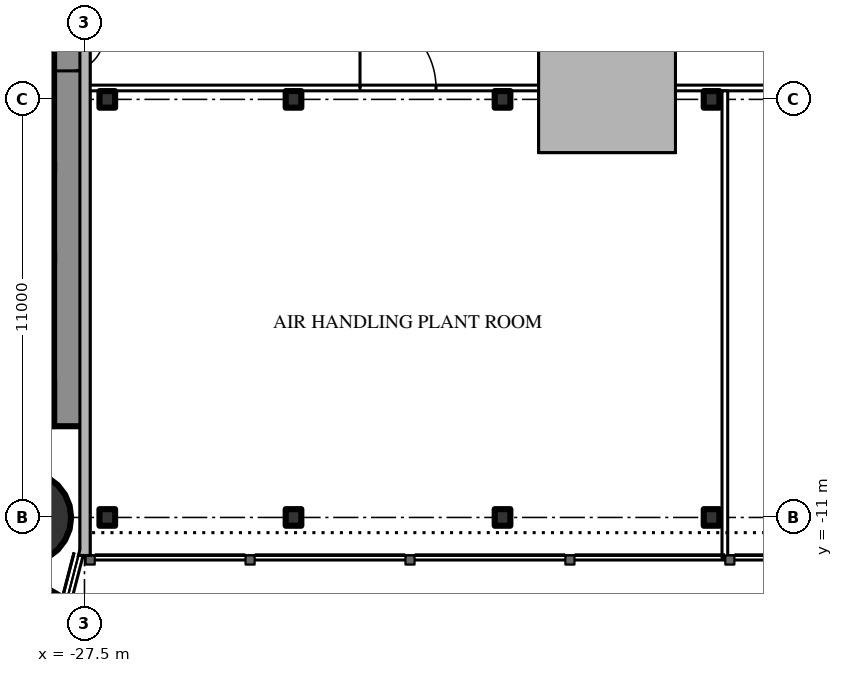
"""IFC4 building model, lengths in metres.
Left out: names, types, materials, properties, quantities, classifications, styles, units other than length and angle.
Written with IfcOpenShell. Run it as: python <this file> out.ifc"""

import sys

from ifc_helpers import new_model, si_unit, direction, frame, frame_2d, origin, origin_2d, place, context, subcontext, project, spatial, rectangle, circle, i_section, extrude, element, fill, save


model = new_model("IFC4")
c1 = context("Model", 3, precision=1e-05, world=origin(), true_north=direction((0.0, 1.0)))
c2 = subcontext(c1, "Body", "Model", "MODEL_VIEW")
j1 = project(units=[si_unit("LENGTHUNIT", "METRE"), si_unit("PLANEANGLEUNIT", "RADIAN")], contexts=[c1])
p1 = place(None, origin())
s1 = spatial("IfcSite", under=j1, at=p1, CompositionType="ELEMENT")
p2 = place(p1, origin())
s2 = spatial("IfcBuilding", under=s1, at=p2, CompositionType="ELEMENT")
p3 = place(p2, frame((0.0, 0.0, 268.3)))
s3 = spatial("IfcBuildingStorey", under=s2, at=p3, CompositionType="ELEMENT", Elevation=268.3)
p4 = place(p3, frame((-29.05, -11.0, 0.0), z_axis=(0.0, 0.0, 1.0), x_axis=(1.0, 0.0, 0.0)))
e1 = element("IfcColumn", 1, at=p4, inside=s3, PredefinedType="COLUMN", context=c2, shape_type="SweptSolid", body=[
    extrude(circle(Radius=1.2, at=origin_2d()), origin(), (0.0, 0.0, 1.0), 5.0),
])
p5 = place(p3, frame((-27.9, 8.6, 0.0), z_axis=(0.0, 0.0, 1.0), x_axis=(0.0, -1.0, 0.0)))
e2 = element("IfcWall", 2, at=p5, inside=s3, PredefinedType="SHEAR", context=c2, shape_type="SweptSolid", body=[
    extrude(rectangle(XDim=17.2, YDim=0.8, at=frame_2d((8.6, 0.0))), origin(), (0.0, 0.0, 1.0), 5.0),
])
p6 = place(p5, frame((6.95, 0.0, 0.0)))
e3 = element("IfcOpeningElement", 3, at=p6, cuts=e2, PredefinedType="OPENING", context=c2, shape_type="SweptSolid", body=[
    extrude(rectangle(XDim=0.9, YDim=2.2, at=frame_2d((0.45, 1.1))), frame((0.0, 0.41, 0.0), z_axis=(0.0, -1.0, 0.0), x_axis=(1.0, 0.0, 0.0)), (0.0, 0.0, 1.0), 0.82),
])
p7 = place(p3, frame((-28.3, -8.0, 0.0), z_axis=(0.0, 0.0, 1.0), x_axis=(-1.0, 0.0, 0.0)))
e4 = element("IfcWall", 4, at=p7, inside=s3, PredefinedType="SHEAR", context=c2, shape_type="SweptSolid", body=[
    extrude(rectangle(XDim=8.4, YDim=1.2, at=frame_2d((4.2, 0.0))), origin(), (0.0, 0.0, 1.0), 5.0),
])
p8 = place(p7, frame((0.25, 0.0, 0.0)))
e5 = element("IfcOpeningElement", 5, at=p8, cuts=e4, PredefinedType="OPENING", context=c2, shape_type="SweptSolid", body=[
    extrude(rectangle(XDim=1.0, YDim=2.2, at=frame_2d((0.5, 1.1))), frame((0.0, 0.61, 0.0), z_axis=(0.0, -1.0, 0.0), x_axis=(1.0, 0.0, 0.0)), (0.0, 0.0, 1.0), 1.22),
])
p9 = place(p3, frame((-28.3, -4.15, 0.0), z_axis=(0.0, 0.0, 1.0), x_axis=(-1.0, 0.0, 0.0)))
e6 = element("IfcWall", 6, at=p9, inside=s3, PredefinedType="SHEAR", context=c2, shape_type="SweptSolid", body=[
    extrude(rectangle(XDim=8.4, YDim=0.3, at=frame_2d((4.2, 0.0))), origin(), (0.0, 0.0, 1.0), 5.0),
])
p10 = place(p3, frame((-28.3, -1.775, 0.0), z_axis=(0.0, 0.0, 1.0), x_axis=(-1.0, 0.0, 0.0)))
e7 = element("IfcWall", 7, at=p10, inside=s3, PredefinedType="SHEAR", context=c2, shape_type="SweptSolid", body=[
    extrude(rectangle(XDim=2.9, YDim=0.25, at=frame_2d((1.45, 0.0))), origin(), (0.0, 0.0, 1.0), 5.0),
])
p11 = place(p3, frame((-27.2, 14.3, 0.0), z_axis=(0.0, 0.0, 1.0), x_axis=(-0.866026593062, -0.499997940104, 0.0)))
e8 = element("IfcWall", 8, at=p11, inside=s3, PredefinedType="SHEAR", context=c2, shape_type="SweptSolid", body=[
    extrude(rectangle(XDim=28.946, YDim=1.2, at=frame_2d((14.473, 0.0))), origin(), (0.0, 0.0, 1.0), 5.0),
])
p12 = place(p11, frame((4.6, 0.0, 0.0)))
e9 = element("IfcOpeningElement", 9, at=p12, cuts=e8, PredefinedType="OPENING", context=c2, shape_type="SweptSolid", body=[
    extrude(rectangle(XDim=1.0, YDim=2.2, at=frame_2d((0.5, 1.1))), frame((0.0, 0.61, 0.0), z_axis=(0.0, -1.0, 0.0), x_axis=(1.0, 0.0, 0.0)), (0.0, 0.0, 1.0), 1.22),
])
p13 = place(p11, frame((13.395, 0.0, 0.0)))
e10 = element("IfcOpeningElement", 10, at=p13, cuts=e8, PredefinedType="OPENING", context=c2, shape_type="SweptSolid", body=[
    extrude(rectangle(XDim=1.8, YDim=2.2, at=frame_2d((0.9, 1.1))), frame((0.0, 0.61, 0.0), z_axis=(0.0, -1.0, 0.0), x_axis=(1.0, 0.0, 0.0)), (0.0, 0.0, 1.0), 1.22),
])
p14 = place(p3, frame((-27.2, -14.3, 0.0), z_axis=(0.0, 0.0, 1.0), x_axis=(-0.866024021859, 0.500002393557, 0.0)))
e11 = element("IfcWall", 11, at=p14, inside=s3, PredefinedType="SHEAR", context=c2, shape_type="SweptSolid", body=[
    extrude(rectangle(XDim=27.907, YDim=1.2, at=frame_2d((13.954, 0.0))), origin(), (0.0, 0.0, 1.0), 5.0),
])
p15 = place(p14, frame((4.6, 0.0, 0.0)))
e12 = element("IfcOpeningElement", 12, at=p15, cuts=e11, PredefinedType="OPENING", context=c2, shape_type="SweptSolid", body=[
    extrude(rectangle(XDim=1.0, YDim=2.2, at=frame_2d((0.5, 1.1))), frame((0.0, 0.61, 0.0), z_axis=(0.0, -1.0, 0.0), x_axis=(1.0, 0.0, 0.0)), (0.0, 0.0, 1.0), 1.22),
])
p16 = place(p14, frame((13.395, 0.0, 0.0)))
e13 = element("IfcOpeningElement", 13, at=p16, cuts=e11, PredefinedType="OPENING", context=c2, shape_type="SweptSolid", body=[
    extrude(rectangle(XDim=1.8, YDim=2.2, at=frame_2d((0.9, 1.1))), frame((0.0, 0.61, 0.0), z_axis=(0.0, -1.0, 0.0), x_axis=(1.0, 0.0, 0.0)), (0.0, 0.0, 1.0), 1.22),
])
for number, where, z_axis, x_axis in (
    (14, (-26.9, -11.0, 0.0), (0.0, 0.0, 1.0), (1.0, 0.0, 0.0)),
    (15, (-22.0, -11.0, 0.0), (0.0, 0.0, 1.0), (1.0, 0.0, 0.0)),
    (16, (-16.5, -11.0, 0.0), (0.0, 0.0, 1.0), (1.0, 0.0, 0.0)),
    (17, (-11.0, -11.0, 0.0), (0.0, 0.0, 1.0), (1.0, 0.0, 0.0)),
    (18, (-26.9, 0.0, 0.0), (0.0, 0.0, 1.0), (1.0, 0.0, 0.0)),
    (19, (-22.0, 0.0, 0.0), (0.0, 0.0, 1.0), (1.0, 0.0, 0.0)),
    (20, (-16.5, 0.0, 0.0), (0.0, 0.0, 1.0), (1.0, 0.0, 0.0)),
    (21, (-11.0, 0.0, 0.0), (0.0, 0.0, 1.0), (1.0, 0.0, 0.0)),
):
    element("IfcColumn", number, at=place(p3, frame(where, z_axis=z_axis, x_axis=x_axis)), inside=s3, PredefinedType="COLUMN", context=c2, shape_type="SweptSolid", body=[
        extrude(i_section(OverallWidth=0.412, OverallDepth=0.437, WebThickness=0.036, FlangeThickness=0.058, FilletRadius=0.015, at=origin_2d()), origin(), (0.0, 0.0, 1.0), 5.0),
    ])
p17 = place(p3, frame((-15.55, -1.3, 5.0), z_axis=(0.0, 0.0, 1.0), x_axis=(1.0, 0.0, 0.0)))
e22 = element("IfcWall", 22, at=p17, inside=s3, PredefinedType="SOLIDWALL", context=c2, shape_type="SweptSolid", body=[
    extrude(rectangle(XDim=3.6, YDim=0.2, at=frame_2d((1.8, 0.0))), origin(), (0.0, 0.0, 1.0), 2.6),
])
p18 = place(p17, frame((1.3, 0.0, 0.0)))
e23 = element("IfcOpeningElement", 23, at=p18, cuts=e22, PredefinedType="OPENING", context=c2, shape_type="SweptSolid", body=[
    extrude(rectangle(XDim=1.0, YDim=2.2, at=frame_2d((0.5, 1.1))), frame((0.0, 0.11, 0.0), z_axis=(0.0, -1.0, 0.0), x_axis=(1.0, 0.0, 0.0)), (0.0, 0.0, 1.0), 0.22),
])
p19 = place(p3, frame((-11.95, 1.3, 5.0), z_axis=(0.0, 0.0, 1.0), x_axis=(-1.0, 0.0, 0.0)))
e24 = element("IfcWall", 24, at=p19, inside=s3, PredefinedType="SOLIDWALL", context=c2, shape_type="SweptSolid", body=[
    extrude(rectangle(XDim=3.6, YDim=0.2, at=frame_2d((1.8, 0.0))), origin(), (0.0, 0.0, 1.0), 2.6),
])
for number, where, z_axis, x_axis in (
    (25, (-15.45, 1.2, 5.0), (0.0, 0.0, 1.0), (0.0, -1.0, 0.0)),
    (26, (-12.05, -1.2, 5.0), (0.0, 0.0, 1.0), (0.0, 1.0, 0.0)),
):
    element("IfcWall", number, at=place(p3, frame(where, z_axis=z_axis, x_axis=x_axis)), inside=s3, PredefinedType="SOLIDWALL", context=c2, shape_type="SweptSolid", body=[
        extrude(rectangle(XDim=2.4, YDim=0.2, at=frame_2d((1.2, 0.0))), origin(), (0.0, 0.0, 1.0), 2.6),
    ])
p20 = place(p3, frame((-27.5, 0.3, 0.0), z_axis=(0.0, 0.0, 1.0), x_axis=(1.0, 0.0, 0.0)))
e27 = element("IfcWall", 27, at=p20, inside=s3, PredefinedType="PARTITIONING", context=c2, shape_type="SweptSolid", body=[
    extrude(rectangle(XDim=55.0, YDim=0.15, at=frame_2d((27.5, 0.0))), origin(), (0.0, 0.0, 1.0), 4.163),
])
p21 = place(p20, frame((7.25, 0.0, 0.0)))
e28 = element("IfcOpeningElement", 28, at=p21, cuts=e27, PredefinedType="OPENING", context=c2, shape_type="SweptSolid", body=[
    extrude(rectangle(XDim=2.0, YDim=2.4, at=frame_2d((1.0, 1.2))), frame((0.0, 0.085, 0.0), z_axis=(0.0, -1.0, 0.0), x_axis=(1.0, 0.0, 0.0)), (0.0, 0.0, 1.0), 0.17),
])
p22 = place(p20, frame((29.25, 0.0, 0.0)))
e29 = element("IfcOpeningElement", 29, at=p22, cuts=e27, PredefinedType="OPENING", context=c2, shape_type="SweptSolid", body=[
    extrude(rectangle(XDim=2.0, YDim=2.4, at=frame_2d((1.0, 1.2))), frame((0.0, 0.085, 0.0), z_axis=(0.0, -1.0, 0.0), x_axis=(1.0, 0.0, 0.0)), (0.0, 0.0, 1.0), 0.17),
])
p23 = place(p20, frame((45.75, 0.0, 0.0)))
e30 = element("IfcOpeningElement", 30, at=p23, cuts=e27, PredefinedType="OPENING", context=c2, shape_type="SweptSolid", body=[
    extrude(rectangle(XDim=2.0, YDim=2.4, at=frame_2d((1.0, 1.2))), frame((0.0, 0.085, 0.0), z_axis=(0.0, -1.0, 0.0), x_axis=(1.0, 0.0, 0.0)), (0.0, 0.0, 1.0), 0.17),
])
p24 = place(p3, frame((-10.65, -12.07, 0.0), z_axis=(0.0, 0.0, 1.0), x_axis=(0.0, 1.0, 0.0)))
e31 = element("IfcWall", 31, at=p24, inside=s3, PredefinedType="PARTITIONING", context=c2, shape_type="SweptSolid", body=[
    extrude(rectangle(XDim=12.295, YDim=0.15, at=frame_2d((6.147, 0.0))), origin(), (0.0, 0.0, 1.0), 4.7),
])
p25 = place(p18, origin())
e32 = element("IfcDoor", 32, at=p25, inside=s3, OperationType="SINGLE_SWING_LEFT", PredefinedType="DOOR", context=c2, shape_type="SweptSolid", body=[
    extrude(rectangle(XDim=1.0, YDim=2.2, at=frame_2d((0.5, 1.1))), frame((0.0, 0.025, 0.0), z_axis=(0.0, -1.0, 0.0), x_axis=(1.0, 0.0, 0.0)), (0.0, 0.0, 1.0), 0.05),
])
fill(e23, e32)
p26 = place(p6, origin())
e33 = element("IfcDoor", 33, at=p26, inside=s3, OperationType="SINGLE_SWING_LEFT", PredefinedType="DOOR", context=c2, shape_type="SweptSolid", body=[
    extrude(rectangle(XDim=0.9, YDim=2.2, at=frame_2d((0.45, 1.1))), frame((0.0, 0.025, 0.0), z_axis=(0.0, -1.0, 0.0), x_axis=(1.0, 0.0, 0.0)), (0.0, 0.0, 1.0), 0.05),
])
fill(e3, e33)
p27 = place(p21, origin())
e34 = element("IfcDoor", 34, at=p27, inside=s3, OperationType="DOUBLE_DOOR_SINGLE_SWING", PredefinedType="DOOR", context=c2, shape_type="SweptSolid", body=[
    extrude(rectangle(XDim=2.0, YDim=2.4, at=frame_2d((1.0, 1.2))), frame((0.0, 0.025, 0.0), z_axis=(0.0, -1.0, 0.0), x_axis=(1.0, 0.0, 0.0)), (0.0, 0.0, 1.0), 0.05),
])
fill(e28, e34)
save(model, sys.argv[1])
